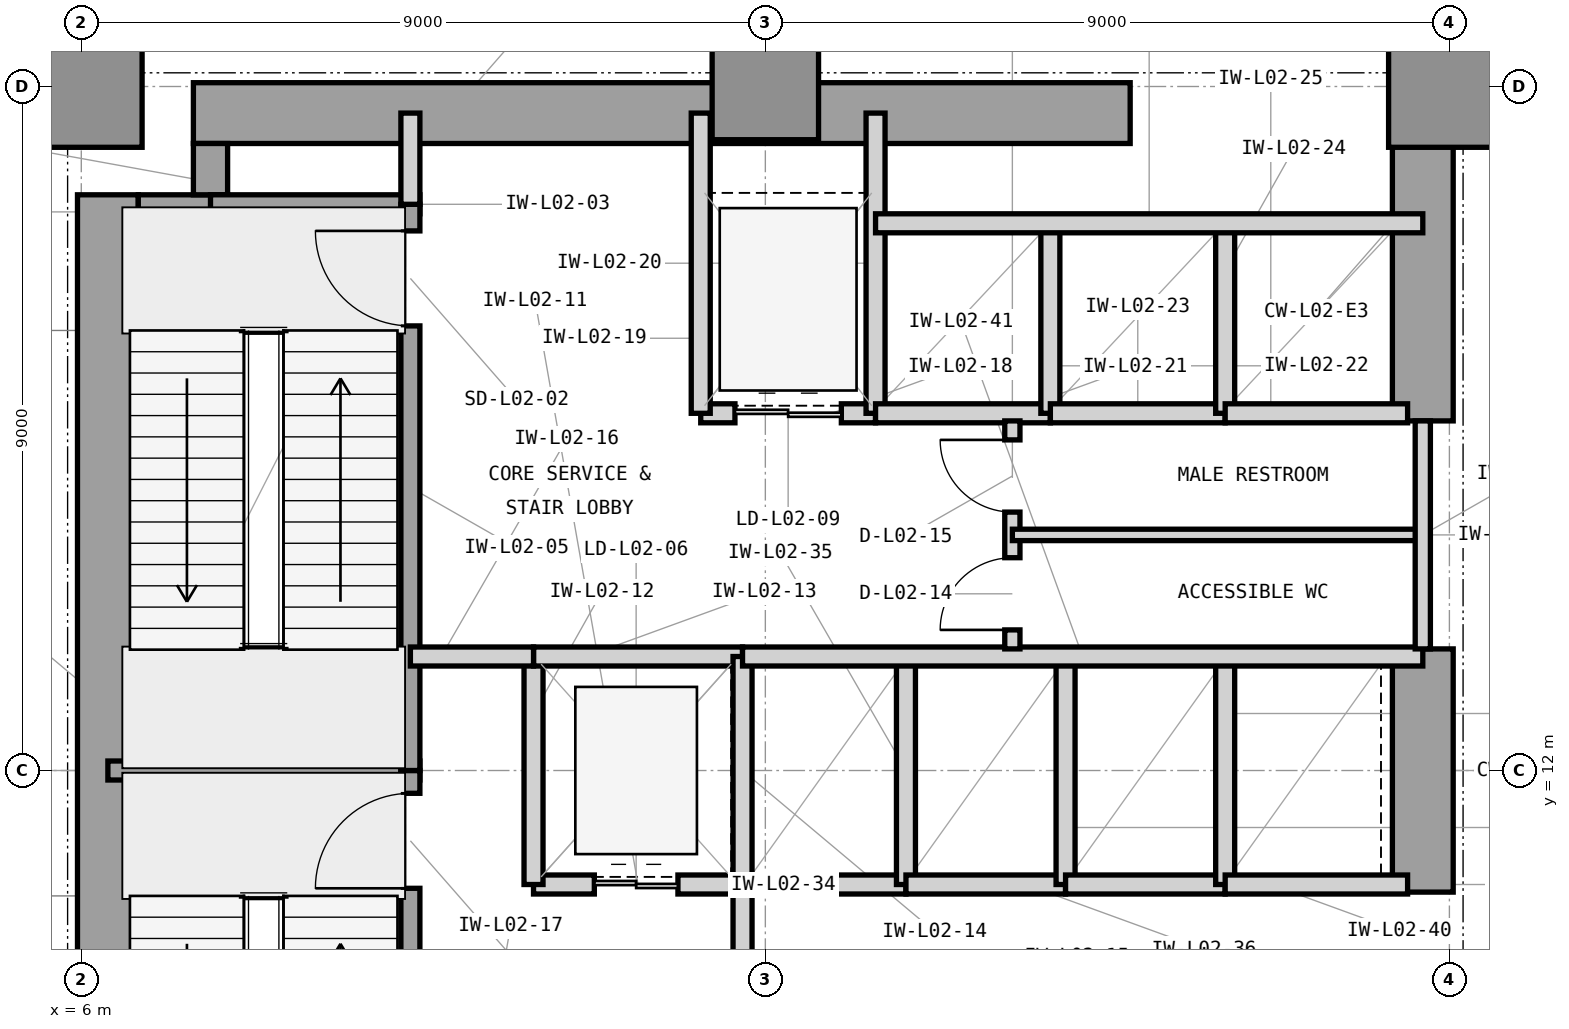
"""IFC4 building model, lengths in metres.
Left out: names, types, materials, properties, quantities, classifications, styles, units other than length and angle.
Written with IfcOpenShell. Run it as: python <this file> out.ifc"""

import sys

from ifc_helpers import new_model, si_unit, direction, frame, frame_2d, origin, origin_2d, place, context, subcontext, project, spatial, rectangle, extrude, element, fill, save


model = new_model("IFC4")
c1 = context("Model", 3, precision=1e-05, world=origin(), true_north=direction((0.0, 1.0)))
c2 = subcontext(c1, "Body", "Model", "MODEL_VIEW")
j1 = project(units=[si_unit("LENGTHUNIT", "METRE"), si_unit("PLANEANGLEUNIT", "RADIAN")], contexts=[c1])
p1 = place(None, origin())
s1 = spatial("IfcSite", under=j1, at=p1, CompositionType="ELEMENT")
p2 = place(p1, origin())
s2 = spatial("IfcBuilding", under=s1, at=p2, CompositionType="ELEMENT")
p3 = place(p2, frame((0.0, 0.0, 10.8)))
s3 = spatial("IfcBuildingStorey", under=s2, at=p3, CompositionType="ELEMENT", Elevation=10.8)
p4 = place(p3, frame((6.35, 4.425, 0.0), z_axis=(0.0, 0.0, 1.0), x_axis=(0.0, 1.0, 0.0)))
e1 = element("IfcWall", 1, at=p4, inside=s3, PredefinedType="SHEAR", context=c2, shape_type="SweptSolid", body=[
    extrude(rectangle(XDim=15.15, YDim=0.8, at=frame_2d((7.575, 0.0))), origin(), (0.0, 0.0, 1.0), 5.4),
])
p5 = place(p3, frame((7.475, 20.65, 0.0), z_axis=(0.0, 0.0, 1.0), x_axis=(1.0, 0.0, 0.0)))
e2 = element("IfcWall", 2, at=p5, inside=s3, PredefinedType="SHEAR", context=c2, shape_type="SweptSolid", body=[
    extrude(rectangle(XDim=12.325, YDim=0.8, at=frame_2d((6.163, 0.0))), origin(), (0.0, 0.0, 1.0), 5.4),
])
p6 = place(p3, frame((23.65, 10.4, 0.0), z_axis=(0.0, 0.0, 1.0), x_axis=(0.0, 1.0, 0.0)))
e3 = element("IfcWall", 3, at=p6, inside=s3, PredefinedType="SHEAR", context=c2, shape_type="SweptSolid", body=[
    extrude(rectangle(XDim=3.2, YDim=0.8, at=frame_2d((1.6, 0.0))), origin(), (0.0, 0.0, 1.0), 5.4),
])
p7 = place(p3, frame((23.65, 16.6, 0.0), z_axis=(0.0, 0.0, 1.0), x_axis=(0.0, 1.0, 0.0)))
e4 = element("IfcWall", 4, at=p7, inside=s3, PredefinedType="SHEAR", context=c2, shape_type="SweptSolid", body=[
    extrude(rectangle(XDim=4.05, YDim=0.8, at=frame_2d((2.025, 0.0))), origin(), (0.0, 0.0, 1.0), 5.4),
])
p8 = place(p3, frame((6.75, 19.35, 0.0), z_axis=(0.0, 0.0, 1.0), x_axis=(1.0, 0.0, 0.0)))
e5 = element("IfcWall", 5, at=p8, inside=s3, PredefinedType="SHEAR", context=c2, shape_type="SweptSolid", body=[
    extrude(rectangle(XDim=1.175, YDim=0.45, at=frame_2d((0.587, 0.0))), origin(), (0.0, 0.0, 1.0), 5.4),
])
p9 = place(p3, frame((7.7, 19.575, 0.0), z_axis=(0.0, 0.0, 1.0), x_axis=(0.0, 1.0, 0.0)))
e6 = element("IfcWall", 6, at=p9, inside=s3, PredefinedType="SHEAR", context=c2, shape_type="SweptSolid", body=[
    extrude(rectangle(XDim=0.675, YDim=0.45, at=frame_2d((0.337, 0.0))), origin(), (0.0, 0.0, 1.0), 5.4),
])
p10 = place(p3, frame((6.0, 21.0, 0.0), z_axis=(0.0, 0.0, 1.0), x_axis=(1.0, 0.0, 0.0)))
e7 = element("IfcColumn", 7, at=p10, inside=s3, PredefinedType="COLUMN", context=c2, shape_type="SweptSolid", body=[
    extrude(rectangle(XDim=1.6, YDim=1.6, at=origin_2d()), origin(), (0.0, 0.0, 1.0), 4.8),
])
p11 = place(p3, frame((15.0, 21.0, 0.0), z_axis=(0.0, 0.0, 1.0), x_axis=(1.0, 0.0, 0.0)))
e8 = element("IfcColumn", 8, at=p11, inside=s3, PredefinedType="COLUMN", context=c2, shape_type="SweptSolid", body=[
    extrude(rectangle(XDim=1.4, YDim=1.4, at=origin_2d()), origin(), (0.0, 0.0, 1.0), 4.8),
])
p12 = place(p3, frame((24.0, 21.0, 0.0), z_axis=(0.0, 0.0, 1.0), x_axis=(1.0, 0.0, 0.0)))
e9 = element("IfcColumn", 9, at=p12, inside=s3, PredefinedType="COLUMN", context=c2, shape_type="SweptSolid", body=[
    extrude(rectangle(XDim=1.6, YDim=1.6, at=origin_2d()), origin(), (0.0, 0.0, 1.0), 4.8),
])
p13 = place(p3, frame((6.35, 12.0, 0.0), z_axis=(0.0, 0.0, 1.0), x_axis=(1.0, 0.0, 0.0)))
e10 = element("IfcWall", 10, at=p13, inside=s3, PredefinedType="SHEAR", context=c2, shape_type="SweptSolid", body=[
    extrude(rectangle(XDim=4.105, YDim=0.25, at=frame_2d((2.052, 0.0))), origin(), (0.0, 0.0, 1.0), 5.4),
])
p14 = place(p3, frame((7.7, 19.45, 0.0), z_axis=(0.0, 0.0, 1.0), x_axis=(1.0, 0.0, 0.0)))
e11 = element("IfcWall", 11, at=p14, inside=s3, PredefinedType="SHEAR", context=c2, shape_type="SweptSolid", body=[
    extrude(rectangle(XDim=2.755, YDim=0.25, at=frame_2d((1.377, 0.0))), origin(), (0.0, 0.0, 1.0), 5.4),
])
p15 = place(p3, frame((10.33, 4.55, 0.0), z_axis=(0.0, 0.0, 1.0), x_axis=(0.0, 1.0, 0.0)))
e12 = element("IfcWall", 12, at=p15, inside=s3, PredefinedType="SHEAR", context=c2, shape_type="SweptSolid", body=[
    extrude(rectangle(XDim=7.45, YDim=0.25, at=frame_2d((3.725, 0.0))), origin(), (0.0, 0.0, 1.0), 5.4),
])
p16 = place(p15, frame((5.9, 0.0, 0.0)))
e13 = element("IfcOpeningElement", 13, at=p16, cuts=e12, PredefinedType="OPENING", context=c2, shape_type="SweptSolid", body=[
    extrude(rectangle(XDim=1.25, YDim=2.2, at=frame_2d((0.625, 1.1))), frame((0.0, 0.135, 0.0), z_axis=(0.0, -1.0, 0.0), x_axis=(1.0, 0.0, 0.0)), (0.0, 0.0, 1.0), 0.27),
])
p17 = place(p3, frame((10.33, 12.0, 0.0), z_axis=(0.0, 0.0, 1.0), x_axis=(0.0, 1.0, 0.0)))
e14 = element("IfcWall", 14, at=p17, inside=s3, PredefinedType="SHEAR", context=c2, shape_type="SweptSolid", body=[
    extrude(rectangle(XDim=7.45, YDim=0.25, at=frame_2d((3.725, 0.0))), origin(), (0.0, 0.0, 1.0), 5.4),
])
p18 = place(p17, frame((5.85, 0.0, 0.0)))
e15 = element("IfcOpeningElement", 15, at=p18, cuts=e14, PredefinedType="OPENING", context=c2, shape_type="SweptSolid", body=[
    extrude(rectangle(XDim=1.25, YDim=2.2, at=frame_2d((0.625, 1.1))), frame((0.0, 0.135, 0.0), z_axis=(0.0, -1.0, 0.0), x_axis=(1.0, 0.0, 0.0)), (0.0, 0.0, 1.0), 0.27),
])
p19 = place(p3, frame((10.33, 19.45, 0.0), z_axis=(0.0, 0.0, 1.0), x_axis=(0.0, 1.0, 0.0)))
e16 = element("IfcWall", 16, at=p19, inside=s3, PredefinedType="PARTITIONING", context=c2, shape_type="SweptSolid", body=[
    extrude(rectangle(XDim=1.2, YDim=0.25, at=frame_2d((0.6, 0.0))), origin(), (0.0, 0.0, 1.0), 3.85),
])
p20 = place(p3, frame((11.95, 10.5, 0.0), z_axis=(0.0, 0.0, 1.0), x_axis=(1.0, 0.0, 0.0)))
e17 = element("IfcWall", 17, at=p20, inside=s3, PredefinedType="PARTITIONING", context=c2, shape_type="SweptSolid", body=[
    extrude(rectangle(XDim=2.75, YDim=0.25, at=frame_2d((1.375, 0.0))), origin(), (0.0, 0.0, 1.0), 4.173),
])
p21 = place(p20, frame((0.8, 0.0, 0.0)))
e18 = element("IfcOpeningElement", 18, at=p21, cuts=e17, PredefinedType="OPENING", context=c2, shape_type="SweptSolid", body=[
    extrude(rectangle(XDim=1.1, YDim=2.25, at=frame_2d((0.55, 1.125))), frame((0.0, 0.135, 0.0), z_axis=(0.0, -1.0, 0.0), x_axis=(1.0, 0.0, 0.0)), (0.0, 0.0, 1.0), 0.27),
])
p22 = place(p3, frame((11.95, 10.5, 0.0), z_axis=(0.0, 0.0, 1.0), x_axis=(0.0, 1.0, 0.0)))
e19 = element("IfcWall", 19, at=p22, inside=s3, PredefinedType="PARTITIONING", context=c2, shape_type="SweptSolid", body=[
    extrude(rectangle(XDim=3.0, YDim=0.25, at=frame_2d((1.5, 0.0))), origin(), (0.0, 0.0, 1.0), 4.79),
])
p23 = place(p3, frame((11.95, 13.5, 0.0), z_axis=(0.0, 0.0, 1.0), x_axis=(1.0, 0.0, 0.0)))
e20 = element("IfcWall", 20, at=p23, inside=s3, PredefinedType="PARTITIONING", context=c2, shape_type="SweptSolid", body=[
    extrude(rectangle(XDim=2.75, YDim=0.25, at=frame_2d((1.375, 0.0))), origin(), (0.0, 0.0, 1.0), 4.173),
])
p24 = place(p3, frame((14.7, 10.5, 0.0), z_axis=(0.0, 0.0, 1.0), x_axis=(0.0, 1.0, 0.0)))
e21 = element("IfcWall", 21, at=p24, inside=s3, PredefinedType="PARTITIONING", context=c2, shape_type="SweptSolid", body=[
    extrude(rectangle(XDim=3.0, YDim=0.25, at=frame_2d((1.5, 0.0))), origin(), (0.0, 0.0, 1.0), 4.79),
])
p25 = place(p3, frame((14.7, 6.7, 0.0), z_axis=(0.0, 0.0, 1.0), x_axis=(0.0, 1.0, 0.0)))
e22 = element("IfcWall", 22, at=p25, inside=s3, PredefinedType="PARTITIONING", context=c2, shape_type="SweptSolid", body=[
    extrude(rectangle(XDim=3.8, YDim=0.25, at=frame_2d((1.9, 0.0))), origin(), (0.0, 0.0, 1.0), 4.79),
])
p26 = place(p25, frame((1.3, 0.0, 0.0)))
e23 = element("IfcOpeningElement", 23, at=p26, cuts=e22, PredefinedType="OPENING", context=c2, shape_type="SweptSolid", body=[
    extrude(rectangle(XDim=1.2, YDim=2.2, at=frame_2d((0.6, 1.1))), frame((0.0, 0.135, 0.0), z_axis=(0.0, -1.0, 0.0), x_axis=(1.0, 0.0, 0.0)), (0.0, 0.0, 1.0), 0.27),
])
p27 = place(p3, frame((10.33, 13.5, 0.0), z_axis=(0.0, 0.0, 1.0), x_axis=(1.0, 0.0, 0.0)))
e24 = element("IfcWall", 24, at=p27, inside=s3, PredefinedType="PARTITIONING", context=c2, shape_type="SweptSolid", body=[
    extrude(rectangle(XDim=1.62, YDim=0.25, at=frame_2d((0.81, 0.0))), origin(), (0.0, 0.0, 1.0), 4.173),
])
p28 = place(p3, frame((14.15, 16.7, 0.0), z_axis=(0.0, 0.0, 1.0), x_axis=(1.0, 0.0, 0.0)))
e25 = element("IfcWall", 25, at=p28, inside=s3, PredefinedType="PARTITIONING", context=c2, shape_type="SweptSolid", body=[
    extrude(rectangle(XDim=2.3, YDim=0.25, at=frame_2d((1.15, 0.0))), origin(), (0.0, 0.0, 1.0), 4.173),
])
p29 = place(p28, frame((0.45, 0.0, 0.0)))
e26 = element("IfcOpeningElement", 26, at=p29, cuts=e25, PredefinedType="OPENING", context=c2, shape_type="SweptSolid", body=[
    extrude(rectangle(XDim=1.4, YDim=2.35, at=frame_2d((0.7, 1.175))), frame((0.0, 0.135, 0.0), z_axis=(0.0, -1.0, 0.0), x_axis=(1.0, 0.0, 0.0)), (0.0, 0.0, 1.0), 0.27),
])
for number, where, z_axis, x_axis in (
    (27, (14.15, 16.7, 0.0), (0.0, 0.0, 1.0), (0.0, 1.0, 0.0)),
    (28, (16.45, 16.7, 0.0), (0.0, 0.0, 1.0), (0.0, 1.0, 0.0)),
):
    element("IfcWall", number, at=place(p3, frame(where, z_axis=z_axis, x_axis=x_axis)), inside=s3, PredefinedType="PARTITIONING", context=c2, shape_type="SweptSolid", body=[
        extrude(rectangle(XDim=3.95, YDim=0.25, at=frame_2d((1.975, 0.0))), origin(), (0.0, 0.0, 1.0), 4.79),
    ])
p30 = place(p3, frame((16.45, 16.7, 0.0), z_axis=(0.0, 0.0, 1.0), x_axis=(1.0, 0.0, 0.0)))
e29 = element("IfcWall", 29, at=p30, inside=s3, PredefinedType="PARTITIONING", context=c2, shape_type="SweptSolid", body=[
    extrude(rectangle(XDim=2.3, YDim=0.25, at=frame_2d((1.15, 0.0))), origin(), (0.0, 0.0, 1.0), 4.173),
])
p31 = place(p3, frame((18.75, 16.7, 0.0), z_axis=(0.0, 0.0, 1.0), x_axis=(0.0, 1.0, 0.0)))
e30 = element("IfcWall", 30, at=p31, inside=s3, PredefinedType="PARTITIONING", context=c2, shape_type="SweptSolid", body=[
    extrude(rectangle(XDim=2.5, YDim=0.25, at=frame_2d((1.25, 0.0))), origin(), (0.0, 0.0, 1.0), 4.79),
])
p32 = place(p3, frame((18.75, 16.7, 0.0), z_axis=(0.0, 0.0, 1.0), x_axis=(1.0, 0.0, 0.0)))
e31 = element("IfcWall", 31, at=p32, inside=s3, PredefinedType="PARTITIONING", context=c2, shape_type="SweptSolid", body=[
    extrude(rectangle(XDim=2.3, YDim=0.25, at=frame_2d((1.15, 0.0))), origin(), (0.0, 0.0, 1.0), 4.173),
])
p33 = place(p3, frame((21.05, 16.7, 0.0), z_axis=(0.0, 0.0, 1.0), x_axis=(0.0, 1.0, 0.0)))
e32 = element("IfcWall", 32, at=p33, inside=s3, PredefinedType="PARTITIONING", context=c2, shape_type="SweptSolid", body=[
    extrude(rectangle(XDim=2.5, YDim=0.25, at=frame_2d((1.25, 0.0))), origin(), (0.0, 0.0, 1.0), 4.79),
])
p34 = place(p3, frame((21.05, 16.7, 0.0), z_axis=(0.0, 0.0, 1.0), x_axis=(1.0, 0.0, 0.0)))
e33 = element("IfcWall", 33, at=p34, inside=s3, PredefinedType="PARTITIONING", context=c2, shape_type="SweptSolid", body=[
    extrude(rectangle(XDim=2.4, YDim=0.25, at=frame_2d((1.2, 0.0))), origin(), (0.0, 0.0, 1.0), 4.173),
])
p35 = place(p3, frame((16.45, 19.2, 0.0), z_axis=(0.0, 0.0, 1.0), x_axis=(1.0, 0.0, 0.0)))
e34 = element("IfcWall", 34, at=p35, inside=s3, PredefinedType="PARTITIONING", context=c2, shape_type="SweptSolid", body=[
    extrude(rectangle(XDim=7.2, YDim=0.25, at=frame_2d((3.6, 0.0))), origin(), (0.0, 0.0, 1.0), 4.79),
])
p36 = place(p3, frame((14.7, 10.5, 0.0), z_axis=(0.0, 0.0, 1.0), x_axis=(1.0, 0.0, 0.0)))
e35 = element("IfcWall", 35, at=p36, inside=s3, PredefinedType="PARTITIONING", context=c2, shape_type="SweptSolid", body=[
    extrude(rectangle(XDim=2.15, YDim=0.25, at=frame_2d((1.075, 0.0))), origin(), (0.0, 0.0, 1.0), 4.173),
])
p37 = place(p3, frame((16.85, 10.5, 0.0), z_axis=(0.0, 0.0, 1.0), x_axis=(0.0, 1.0, 0.0)))
e36 = element("IfcWall", 36, at=p37, inside=s3, PredefinedType="PARTITIONING", context=c2, shape_type="SweptSolid", body=[
    extrude(rectangle(XDim=3.0, YDim=0.25, at=frame_2d((1.5, 0.0))), origin(), (0.0, 0.0, 1.0), 4.79),
])
p38 = place(p3, frame((16.85, 10.5, 0.0), z_axis=(0.0, 0.0, 1.0), x_axis=(1.0, 0.0, 0.0)))
e37 = element("IfcWall", 37, at=p38, inside=s3, PredefinedType="PARTITIONING", context=c2, shape_type="SweptSolid", body=[
    extrude(rectangle(XDim=2.1, YDim=0.25, at=frame_2d((1.05, 0.0))), origin(), (0.0, 0.0, 1.0), 4.173),
])
p39 = place(p3, frame((18.95, 10.5, 0.0), z_axis=(0.0, 0.0, 1.0), x_axis=(0.0, 1.0, 0.0)))
e38 = element("IfcWall", 38, at=p39, inside=s3, PredefinedType="PARTITIONING", context=c2, shape_type="SweptSolid", body=[
    extrude(rectangle(XDim=3.0, YDim=0.25, at=frame_2d((1.5, 0.0))), origin(), (0.0, 0.0, 1.0), 4.79),
])
p40 = place(p3, frame((18.95, 10.5, 0.0), z_axis=(0.0, 0.0, 1.0), x_axis=(1.0, 0.0, 0.0)))
e39 = element("IfcWall", 39, at=p40, inside=s3, PredefinedType="PARTITIONING", context=c2, shape_type="SweptSolid", body=[
    extrude(rectangle(XDim=2.1, YDim=0.25, at=frame_2d((1.05, 0.0))), origin(), (0.0, 0.0, 1.0), 4.173),
])
p41 = place(p3, frame((21.05, 10.5, 0.0), z_axis=(0.0, 0.0, 1.0), x_axis=(0.0, 1.0, 0.0)))
e40 = element("IfcWall", 40, at=p41, inside=s3, PredefinedType="PARTITIONING", context=c2, shape_type="SweptSolid", body=[
    extrude(rectangle(XDim=3.0, YDim=0.25, at=frame_2d((1.5, 0.0))), origin(), (0.0, 0.0, 1.0), 4.79),
])
p42 = place(p3, frame((21.05, 10.5, 0.0), z_axis=(0.0, 0.0, 1.0), x_axis=(1.0, 0.0, 0.0)))
e41 = element("IfcWall", 41, at=p42, inside=s3, PredefinedType="PARTITIONING", context=c2, shape_type="SweptSolid", body=[
    extrude(rectangle(XDim=2.4, YDim=0.25, at=frame_2d((1.2, 0.0))), origin(), (0.0, 0.0, 1.0), 4.173),
])
p43 = place(p3, frame((14.7, 13.5, 0.0), z_axis=(0.0, 0.0, 1.0), x_axis=(1.0, 0.0, 0.0)))
e42 = element("IfcWall", 42, at=p43, inside=s3, PredefinedType="PARTITIONING", context=c2, shape_type="SweptSolid", body=[
    extrude(rectangle(XDim=8.95, YDim=0.25, at=frame_2d((4.475, 0.0))), origin(), (0.0, 0.0, 1.0), 4.173),
])
p44 = place(p3, frame((18.25, 13.6, 0.0), z_axis=(0.0, 0.0, 1.0), x_axis=(0.0, 1.0, 0.0)))
e43 = element("IfcWall", 43, at=p44, inside=s3, PredefinedType="PARTITIONING", context=c2, shape_type="SweptSolid", body=[
    extrude(rectangle(XDim=3.0, YDim=0.2, at=frame_2d((1.5, 0.0))), origin(), (0.0, 0.0, 1.0), 4.79),
])
p45 = place(p44, frame((0.25, 0.0, 0.0)))
e44 = element("IfcOpeningElement", 44, at=p45, cuts=e43, PredefinedType="OPENING", context=c2, shape_type="SweptSolid", body=[
    extrude(rectangle(XDim=0.95, YDim=2.1, at=frame_2d((0.475, 1.05))), frame((0.0, 0.11, 0.0), z_axis=(0.0, -1.0, 0.0), x_axis=(1.0, 0.0, 0.0)), (0.0, 0.0, 1.0), 0.22),
])
p46 = place(p44, frame((1.8, 0.0, 0.0)))
e45 = element("IfcOpeningElement", 45, at=p46, cuts=e43, PredefinedType="OPENING", context=c2, shape_type="SweptSolid", body=[
    extrude(rectangle(XDim=0.95, YDim=2.1, at=frame_2d((0.475, 1.05))), frame((0.0, 0.11, 0.0), z_axis=(0.0, -1.0, 0.0), x_axis=(1.0, 0.0, 0.0)), (0.0, 0.0, 1.0), 0.22),
])
p47 = place(p3, frame((18.25, 15.1, 0.0), z_axis=(0.0, 0.0, 1.0), x_axis=(1.0, 0.0, 0.0)))
e46 = element("IfcWall", 46, at=p47, inside=s3, PredefinedType="PARTITIONING", context=c2, shape_type="SweptSolid", body=[
    extrude(rectangle(XDim=5.4, YDim=0.15, at=frame_2d((2.7, 0.0))), origin(), (0.0, 0.0, 1.0), 4.79),
])
p48 = place(p3, frame((23.65, 13.6, 0.0), z_axis=(0.0, 0.0, 1.0), x_axis=(0.0, 1.0, 0.0)))
e47 = element("IfcWall", 47, at=p48, inside=s3, PredefinedType="PARTITIONING", context=c2, shape_type="SweptSolid", body=[
    extrude(rectangle(XDim=3.0, YDim=0.2, at=frame_2d((1.5, 0.0))), origin(), (0.0, 0.0, 1.0), 4.79),
])
p49 = place(p3, frame((6.25, 20.65, 0.0), z_axis=(0.0, 0.0, 1.0), x_axis=(0.0, 1.0, 0.0)))
e48 = element("IfcWall", 48, at=p49, inside=s3, PredefinedType="PARTITIONING", context=c2, shape_type="SweptSolid", body=[
    extrude(rectangle(XDim=9.35, YDim=0.2, at=frame_2d((4.675, 0.0))), origin(), (0.0, 0.0, 1.0), 3.19),
])
p50 = place(p16, origin())
e49 = element("IfcDoor", 49, at=p50, inside=s3, OperationType="SINGLE_SWING_LEFT", PredefinedType="DOOR", context=c2, shape_type="SweptSolid", body=[
    extrude(rectangle(XDim=1.25, YDim=2.2, at=frame_2d((0.625, 1.1))), frame((0.0, 0.025, 0.0), z_axis=(0.0, -1.0, 0.0), x_axis=(1.0, 0.0, 0.0)), (0.0, 0.0, 1.0), 0.05),
])
fill(e13, e49)
p51 = place(p18, origin())
e50 = element("IfcDoor", 50, at=p51, inside=s3, OperationType="SINGLE_SWING_RIGHT", PredefinedType="DOOR", context=c2, shape_type="SweptSolid", body=[
    extrude(rectangle(XDim=1.25, YDim=2.2, at=frame_2d((0.625, 1.1))), frame((0.0, 0.025, 0.0), z_axis=(0.0, -1.0, 0.0), x_axis=(1.0, 0.0, 0.0)), (0.0, 0.0, 1.0), 0.05),
])
fill(e15, e50)
p52 = place(p21, origin())
e51 = element("IfcDoor", 51, at=p52, inside=s3, OperationType="DOUBLE_DOOR_SLIDING", PredefinedType="DOOR", context=c2, shape_type="SweptSolid", body=[
    extrude(rectangle(XDim=1.1, YDim=2.25, at=frame_2d((0.55, 1.125))), frame((0.0, 0.025, 0.0), z_axis=(0.0, -1.0, 0.0), x_axis=(1.0, 0.0, 0.0)), (0.0, 0.0, 1.0), 0.05),
])
fill(e18, e51)
p53 = place(p29, origin())
e52 = element("IfcDoor", 52, at=p53, inside=s3, OperationType="DOUBLE_DOOR_SLIDING", PredefinedType="DOOR", context=c2, shape_type="SweptSolid", body=[
    extrude(rectangle(XDim=1.4, YDim=2.35, at=frame_2d((0.7, 1.175))), frame((0.0, 0.025, 0.0), z_axis=(0.0, -1.0, 0.0), x_axis=(1.0, 0.0, 0.0)), (0.0, 0.0, 1.0), 0.05),
])
fill(e26, e52)
p54 = place(p45, origin())
e53 = element("IfcDoor", 53, at=p54, inside=s3, OperationType="SINGLE_SWING_LEFT", PredefinedType="DOOR", context=c2, shape_type="SweptSolid", body=[
    extrude(rectangle(XDim=0.95, YDim=2.1, at=frame_2d((0.475, 1.05))), frame((0.0, 0.025, 0.0), z_axis=(0.0, -1.0, 0.0), x_axis=(1.0, 0.0, 0.0)), (0.0, 0.0, 1.0), 0.05),
])
fill(e44, e53)
p55 = place(p46, origin())
e54 = element("IfcDoor", 54, at=p55, inside=s3, OperationType="SINGLE_SWING_RIGHT", PredefinedType="DOOR", context=c2, shape_type="SweptSolid", body=[
    extrude(rectangle(XDim=0.95, YDim=2.1, at=frame_2d((0.475, 1.05))), frame((0.0, 0.025, 0.0), z_axis=(0.0, -1.0, 0.0), x_axis=(1.0, 0.0, 0.0)), (0.0, 0.0, 1.0), 0.05),
])
fill(e45, e54)
save(model, sys.argv[1])
